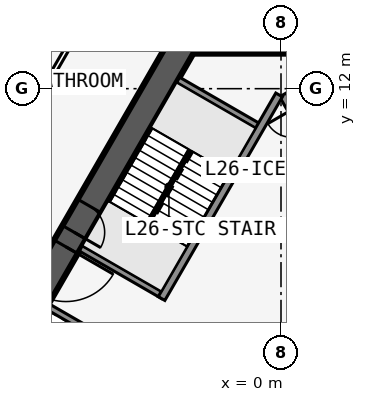
"""IFC4 building model, lengths in metres.
Left out: names, types, materials, properties, quantities, classifications, styles, units other than length and angle.
Written with IfcOpenShell. Run it as: python <this file> out.ifc"""

import sys

from ifc_helpers import new_model, si_unit, direction, frame, frame_2d, origin, place, context, subcontext, project, spatial, rectangle, extrude, element, fill, save


model = new_model("IFC4")
c1 = context("Model", 3, precision=1e-05, world=origin(), true_north=direction((0.0, 1.0)))
c2 = subcontext(c1, "Body", "Model", "MODEL_VIEW")
j1 = project(units=[si_unit("LENGTHUNIT", "METRE"), si_unit("PLANEANGLEUNIT", "RADIAN")], contexts=[c1])
p1 = place(None, origin())
s1 = spatial("IfcSite", under=j1, at=p1, CompositionType="ELEMENT")
p2 = place(p1, origin())
s2 = spatial("IfcBuilding", under=s1, at=p2, CompositionType="ELEMENT")
p3 = place(p2, frame((0.0, 0.0, 99.9)))
s3 = spatial("IfcBuildingStorey", under=s2, at=p3, CompositionType="ELEMENT", Elevation=99.9)
p4 = place(p3, frame((16.5, -9.526, 0.0), z_axis=(0.0, 0.0, 1.0), x_axis=(-0.499999749417, 0.866025548458, 0.0)))
e1 = element("IfcWall", 1, at=p4, inside=s3, PredefinedType="SHEAR", context=c2, shape_type="SweptSolid", body=[
    extrude(rectangle(XDim=33.0, YDim=0.9, at=frame_2d((16.5, 0.0))), origin(), (0.0, 0.0, 1.0), 3.4),
])
p5 = place(p4, frame((14.15, 0.0, 0.0)))
e2 = element("IfcOpeningElement", 2, at=p5, cuts=e1, PredefinedType="OPENING", context=c2, shape_type="SweptSolid", body=[
    extrude(rectangle(XDim=1.8, YDim=2.13, at=frame_2d((0.9, 1.065))), frame((0.0, 0.46, 0.0), z_axis=(0.0, -1.0, 0.0), x_axis=(1.0, 0.0, 0.0)), (0.0, 0.0, 1.0), 0.92),
])
p6 = place(p4, frame((12.6, 0.0, 0.0)))
e3 = element("IfcOpeningElement", 3, at=p6, cuts=e1, PredefinedType="OPENING", context=c2, shape_type="SweptSolid", body=[
    extrude(rectangle(XDim=1.0, YDim=2.13, at=frame_2d((0.5, 1.065))), frame((0.0, 0.46, 0.0), z_axis=(0.0, -1.0, 0.0), x_axis=(1.0, 0.0, 0.0)), (0.0, 0.0, 1.0), 0.92),
])
p7 = place(p3, frame((5.379, 2.586, 0.0), z_axis=(0.0, 0.0, 1.0), x_axis=(-0.500001375892, 0.866024609411, 0.0)))
e4 = element("IfcWall", 4, at=p7, inside=s3, PredefinedType="SOLIDWALL", context=c2, shape_type="SweptSolid", body=[
    extrude(rectangle(XDim=10.633, YDim=0.25, at=frame_2d((5.316, 0.0))), origin(), (0.0, 0.0, 1.0), 3.15),
])
p8 = place(p7, frame((9.164, 0.0, 0.0)))
e5 = element("IfcOpeningElement", 5, at=p8, cuts=e4, PredefinedType="OPENING", context=c2, shape_type="SweptSolid", body=[
    extrude(rectangle(XDim=0.9, YDim=2.13, at=frame_2d((0.45, 1.065))), frame((0.0, 0.135, 0.0), z_axis=(0.0, -1.0, 0.0), x_axis=(1.0, 0.0, 0.0)), (0.0, 0.0, 1.0), 0.27),
])
p9 = place(p7, frame((1.0, 0.0, 0.0)))
e6 = element("IfcOpeningElement", 6, at=p9, cuts=e4, PredefinedType="OPENING", context=c2, shape_type="SweptSolid", body=[
    extrude(rectangle(XDim=1.1, YDim=2.13, at=frame_2d((0.55, 1.065))), frame((0.0, 0.135, 0.0), z_axis=(0.0, -1.0, 0.0), x_axis=(1.0, 0.0, 0.0)), (0.0, 0.0, 1.0), 0.27),
])
p10 = place(p7, frame((3.9, 0.0, 0.0)))
e7 = element("IfcOpeningElement", 7, at=p10, cuts=e4, PredefinedType="OPENING", context=c2, shape_type="SweptSolid", body=[
    extrude(rectangle(XDim=1.1, YDim=2.13, at=frame_2d((0.55, 1.065))), frame((0.0, 0.135, 0.0), z_axis=(0.0, -1.0, 0.0), x_axis=(1.0, 0.0, 0.0)), (0.0, 0.0, 1.0), 0.27),
])
p11 = place(p7, frame((6.8, 0.0, 0.0)))
e8 = element("IfcOpeningElement", 8, at=p11, cuts=e4, PredefinedType="OPENING", context=c2, shape_type="SweptSolid", body=[
    extrude(rectangle(XDim=1.1, YDim=2.13, at=frame_2d((0.55, 1.065))), frame((0.0, 0.135, 0.0), z_axis=(0.0, -1.0, 0.0), x_axis=(1.0, 0.0, 0.0)), (0.0, 0.0, 1.0), 0.27),
])
p12 = place(p3, frame((0.0, 19.052, 0.0), z_axis=(0.0, 0.0, 1.0), x_axis=(-0.499999749417, -0.866025548458, 0.0)))
e9 = element("IfcWall", 9, at=p12, inside=s3, PredefinedType="SHEAR", context=c2, shape_type="SweptSolid", body=[
    extrude(rectangle(XDim=33.0, YDim=0.9, at=frame_2d((16.5, 0.0))), origin(), (0.0, 0.0, 1.0), 3.4),
])
p13 = place(p12, frame((14.15, 0.0, 0.0)))
e10 = element("IfcOpeningElement", 10, at=p13, cuts=e9, PredefinedType="OPENING", context=c2, shape_type="SweptSolid", body=[
    extrude(rectangle(XDim=1.8, YDim=2.13, at=frame_2d((0.9, 1.065))), frame((0.0, 0.46, 0.0), z_axis=(0.0, -1.0, 0.0), x_axis=(1.0, 0.0, 0.0)), (0.0, 0.0, 1.0), 0.92),
])
p14 = place(p12, frame((12.6, 0.0, 0.0)))
e11 = element("IfcOpeningElement", 11, at=p14, cuts=e9, PredefinedType="OPENING", context=c2, shape_type="SweptSolid", body=[
    extrude(rectangle(XDim=1.0, YDim=2.13, at=frame_2d((0.5, 1.065))), frame((0.0, 0.46, 0.0), z_axis=(0.0, -1.0, 0.0), x_axis=(1.0, 0.0, 0.0)), (0.0, 0.0, 1.0), 0.92),
])
p15 = place(p3, frame((-0.062, 11.794, 0.0), z_axis=(0.0, 0.0, 1.0), x_axis=(-0.500006680225, -0.86602154692, 0.0)))
e12 = element("IfcWall", 12, at=p15, inside=s3, PredefinedType="SOLIDWALL", context=c2, shape_type="SweptSolid", body=[
    extrude(rectangle(XDim=7.733, YDim=0.25, at=frame_2d((3.866, 0.0))), origin(), (0.0, 0.0, 1.0), 3.15),
])
for number, where, z_axis, x_axis in (
    (13, (-0.679, 10.727, 0.0), (0.0, 0.0, 1.0), (-0.866, 0.5, 0.0)),
    (14, (-3.879, 5.184, 0.0), (0.0, 0.0, 1.0), (-0.866, 0.5, 0.0)),
    (15, (-4.979, 3.279, 0.0), (0.0, 0.0, 1.0), (-0.866, 0.5, 0.0)),
):
    element("IfcWall", number, at=place(p3, frame(where, z_axis=z_axis, x_axis=x_axis)), inside=s3, PredefinedType="SOLIDWALL", context=c2, shape_type="SweptSolid", body=[
        extrude(rectangle(XDim=3.125, YDim=0.2, at=frame_2d((1.562, 0.0))), origin(), (0.0, 0.0, 1.0), 3.15),
    ])
p16 = place(p3, frame((-0.5, 24.636, 0.0), z_axis=(0.0, 0.0, 1.0), x_axis=(-0.500001915564, -0.86602429783, 0.0)))
e16 = element("IfcWall", 16, at=p16, inside=s3, PredefinedType="PARTITIONING", context=c2, shape_type="SweptSolid", body=[
    extrude(rectangle(XDim=42.172, YDim=0.15, at=frame_2d((21.086, 0.0))), origin(), (0.0, 0.0, 1.0), 3.15),
])
p17 = place(p16, frame((1.911, 0.0, 0.0)))
e17 = element("IfcOpeningElement", 17, at=p17, cuts=e16, PredefinedType="OPENING", context=c2, shape_type="SweptSolid", body=[
    extrude(rectangle(XDim=0.95, YDim=2.13, at=frame_2d((0.475, 1.065))), frame((0.0, 0.085, 0.0), z_axis=(0.0, -1.0, 0.0), x_axis=(1.0, 0.0, 0.0)), (0.0, 0.0, 1.0), 0.17),
])
p18 = place(p16, frame((8.111, 0.0, 0.0)))
e18 = element("IfcOpeningElement", 18, at=p18, cuts=e16, PredefinedType="OPENING", context=c2, shape_type="SweptSolid", body=[
    extrude(rectangle(XDim=0.95, YDim=2.13, at=frame_2d((0.475, 1.065))), frame((0.0, 0.085, 0.0), z_axis=(0.0, -1.0, 0.0), x_axis=(1.0, 0.0, 0.0)), (0.0, 0.0, 1.0), 0.17),
])
p19 = place(p16, frame((18.111, 0.0, 0.0)))
e19 = element("IfcOpeningElement", 19, at=p19, cuts=e16, PredefinedType="OPENING", context=c2, shape_type="SweptSolid", body=[
    extrude(rectangle(XDim=0.95, YDim=2.13, at=frame_2d((0.475, 1.065))), frame((0.0, 0.085, 0.0), z_axis=(0.0, -1.0, 0.0), x_axis=(1.0, 0.0, 0.0)), (0.0, 0.0, 1.0), 0.17),
])
p20 = place(p16, frame((28.711, 0.0, 0.0)))
e20 = element("IfcOpeningElement", 20, at=p20, cuts=e16, PredefinedType="OPENING", context=c2, shape_type="SweptSolid", body=[
    extrude(rectangle(XDim=0.95, YDim=2.13, at=frame_2d((0.475, 1.065))), frame((0.0, 0.085, 0.0), z_axis=(0.0, -1.0, 0.0), x_axis=(1.0, 0.0, 0.0)), (0.0, 0.0, 1.0), 0.17),
])
p21 = place(p16, frame((33.711, 0.0, 0.0)))
e21 = element("IfcOpeningElement", 21, at=p21, cuts=e16, PredefinedType="OPENING", context=c2, shape_type="SweptSolid", body=[
    extrude(rectangle(XDim=0.95, YDim=2.13, at=frame_2d((0.475, 1.065))), frame((0.0, 0.085, 0.0), z_axis=(0.0, -1.0, 0.0), x_axis=(1.0, 0.0, 0.0)), (0.0, 0.0, 1.0), 0.17),
])
p22 = place(p16, frame((39.311, 0.0, 0.0)))
e22 = element("IfcOpeningElement", 22, at=p22, cuts=e16, PredefinedType="OPENING", context=c2, shape_type="SweptSolid", body=[
    extrude(rectangle(XDim=0.95, YDim=2.13, at=frame_2d((0.475, 1.065))), frame((0.0, 0.085, 0.0), z_axis=(0.0, -1.0, 0.0), x_axis=(1.0, 0.0, 0.0)), (0.0, 0.0, 1.0), 0.17),
])
p23 = place(p3, frame((-2.887, 13.153, 0.0), z_axis=(0.0, 0.0, 1.0), x_axis=(1.0, 0.0, 0.0)))
e23 = element("IfcWall", 23, at=p23, inside=s3, PredefinedType="PARTITIONING", context=c2, shape_type="SweptSolid", body=[
    extrude(rectangle(XDim=5.773, YDim=0.1, at=frame_2d((2.887, 0.0))), origin(), (0.0, 0.0, 1.0), 3.15),
])
p24 = place(p23, frame((2.437, 0.0, 0.0)))
e24 = element("IfcOpeningElement", 24, at=p24, cuts=e23, PredefinedType="OPENING", context=c2, shape_type="SweptSolid", body=[
    extrude(rectangle(XDim=0.9, YDim=2.13, at=frame_2d((0.45, 1.065))), frame((0.0, 0.06, 0.0), z_axis=(0.0, -1.0, 0.0), x_axis=(1.0, 0.0, 0.0)), (0.0, 0.0, 1.0), 0.12),
])
p25 = place(p3, frame((-2.988, 9.978, 0.0), z_axis=(0.0, 0.0, 1.0), x_axis=(-0.499992232847, -0.866029888106, 0.0)))
e25 = element("IfcWall", 25, at=p25, inside=s3, PredefinedType="SOLIDWALL", context=c2, shape_type="SweptSolid", body=[
    extrude(rectangle(XDim=2.794, YDim=0.1, at=frame_2d((1.397, 0.0))), origin(), (0.0, 0.0, 1.0), 3.4),
])
p26 = place(p13, origin())
e26 = element("IfcDoor", 26, at=p26, inside=s3, OperationType="DOUBLE_DOOR_SINGLE_SWING", PredefinedType="DOOR", context=c2, shape_type="SweptSolid", body=[
    extrude(rectangle(XDim=1.8, YDim=2.13, at=frame_2d((0.9, 1.065))), frame((0.0, 0.025, 0.0), z_axis=(0.0, -1.0, 0.0), x_axis=(1.0, 0.0, 0.0)), (0.0, 0.0, 1.0), 0.05),
])
fill(e10, e26)
p27 = place(p14, origin())
e27 = element("IfcDoor", 27, at=p27, inside=s3, OperationType="SINGLE_SWING_RIGHT", PredefinedType="DOOR", context=c2, shape_type="SweptSolid", body=[
    extrude(rectangle(XDim=1.0, YDim=2.13, at=frame_2d((0.5, 1.065))), frame((0.0, 0.025, 0.0), z_axis=(0.0, -1.0, 0.0), x_axis=(1.0, 0.0, 0.0)), (0.0, 0.0, 1.0), 0.05),
])
fill(e11, e27)
p28 = place(p24, origin())
e28 = element("IfcDoor", 28, at=p28, inside=s3, OperationType="SINGLE_SWING_RIGHT", PredefinedType="DOOR", context=c2, shape_type="SweptSolid", body=[
    extrude(rectangle(XDim=0.9, YDim=2.13, at=frame_2d((0.45, 1.065))), frame((0.0, 0.025, 0.0), z_axis=(0.0, -1.0, 0.0), x_axis=(1.0, 0.0, 0.0)), (0.0, 0.0, 1.0), 0.05),
])
fill(e24, e28)
save(model, sys.argv[1])
